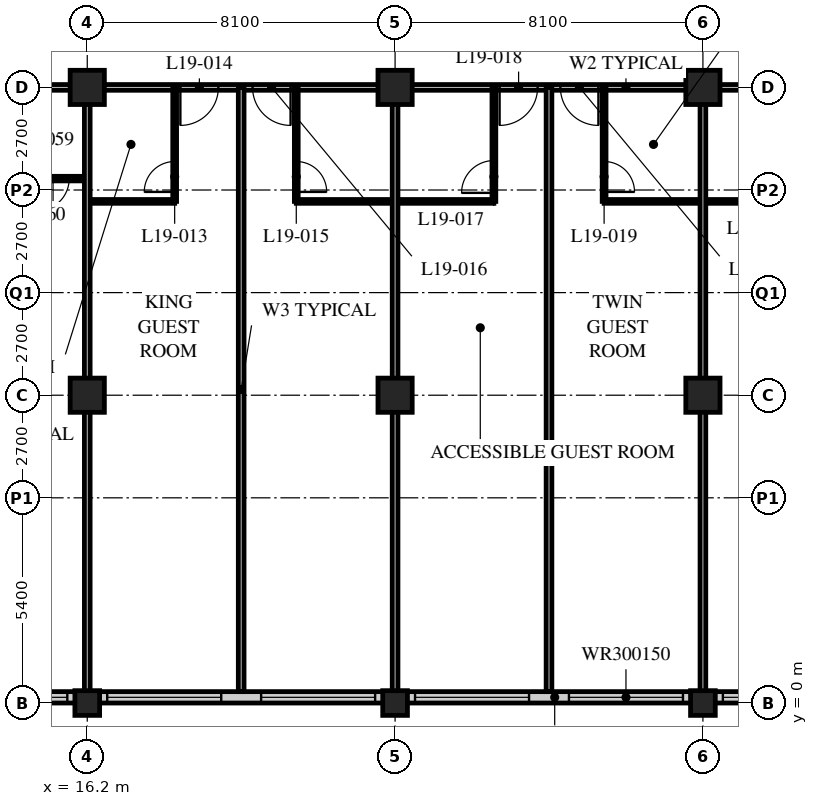
"""IFC4 building model, lengths in metres.
Left out: names, types, materials, properties, quantities, classifications, styles, units other than length and angle.
Written with IfcOpenShell. Run it as: python <this file> out.ifc"""

import sys

from ifc_helpers import new_model, si_unit, direction, frame, frame_2d, origin, origin_2d, place, context, subcontext, project, spatial, rectangle, hollow_rectangle, extrude, element, fill, save


model = new_model("IFC4")
c1 = context("Model", 3, precision=1e-05, world=origin(), true_north=direction((0.0, 1.0)))
c2 = subcontext(c1, "Body", "Model", "MODEL_VIEW")
j1 = project(units=[si_unit("LENGTHUNIT", "METRE"), si_unit("PLANEANGLEUNIT", "RADIAN")], contexts=[c1])
p1 = place(None, origin())
s1 = spatial("IfcSite", under=j1, at=p1, CompositionType="ELEMENT")
p2 = place(p1, origin())
s2 = spatial("IfcBuilding", under=s1, at=p2, CompositionType="ELEMENT")
p3 = place(p2, frame((0.0, 0.0, 77.2)))
s3 = spatial("IfcBuildingStorey", under=s2, at=p3, CompositionType="ELEMENT", Elevation=77.2)
p4 = place(p3, frame((16.2, 0.0, 0.0), z_axis=(0.0, 0.0, 1.0), x_axis=(1.0, 0.0, 0.0)))
e1 = element("IfcColumn", 1, at=p4, inside=s3, PredefinedType="COLUMN", context=c2, shape_type="SweptSolid", body=[
    extrude(hollow_rectangle(XDim=0.65, YDim=0.65, WallThickness=0.05, at=origin_2d()), origin(), (0.0, 0.0, 1.0), 3.4),
])
for number, where, z_axis, x_axis in (
    (2, (16.2, 8.1, 0.0), (0.0, 0.0, 1.0), (1.0, 0.0, 0.0)),
    (3, (16.2, 16.2, 0.0), (0.0, 0.0, 1.0), (1.0, 0.0, 0.0)),
):
    element("IfcColumn", number, at=place(p3, frame(where, z_axis=z_axis, x_axis=x_axis)), inside=s3, PredefinedType="COLUMN", context=c2, shape_type="SweptSolid", body=[
        extrude(hollow_rectangle(XDim=0.9, YDim=0.9, WallThickness=0.09, at=origin_2d()), origin(), (0.0, 0.0, 1.0), 3.4),
    ])
p5 = place(p3, frame((24.3, 0.0, 0.0), z_axis=(0.0, 0.0, 1.0), x_axis=(1.0, 0.0, 0.0)))
e4 = element("IfcColumn", 4, at=p5, inside=s3, PredefinedType="COLUMN", context=c2, shape_type="SweptSolid", body=[
    extrude(hollow_rectangle(XDim=0.65, YDim=0.65, WallThickness=0.05, at=origin_2d()), origin(), (0.0, 0.0, 1.0), 3.4),
])
for number, where, z_axis, x_axis in (
    (5, (24.3, 8.1, 0.0), (0.0, 0.0, 1.0), (1.0, 0.0, 0.0)),
    (6, (24.3, 16.2, 0.0), (0.0, 0.0, 1.0), (1.0, 0.0, 0.0)),
):
    element("IfcColumn", number, at=place(p3, frame(where, z_axis=z_axis, x_axis=x_axis)), inside=s3, PredefinedType="COLUMN", context=c2, shape_type="SweptSolid", body=[
        extrude(hollow_rectangle(XDim=0.9, YDim=0.9, WallThickness=0.09, at=origin_2d()), origin(), (0.0, 0.0, 1.0), 3.4),
    ])
p6 = place(p3, frame((32.4, 0.0, 0.0), z_axis=(0.0, 0.0, 1.0), x_axis=(1.0, 0.0, 0.0)))
e7 = element("IfcColumn", 7, at=p6, inside=s3, PredefinedType="COLUMN", context=c2, shape_type="SweptSolid", body=[
    extrude(hollow_rectangle(XDim=0.65, YDim=0.65, WallThickness=0.05, at=origin_2d()), origin(), (0.0, 0.0, 1.0), 3.4),
])
for number, where, z_axis, x_axis in (
    (8, (32.4, 8.1, 0.0), (0.0, 0.0, 1.0), (1.0, 0.0, 0.0)),
    (9, (32.4, 16.2, 0.0), (0.0, 0.0, 1.0), (1.0, 0.0, 0.0)),
):
    element("IfcColumn", number, at=place(p3, frame(where, z_axis=z_axis, x_axis=x_axis)), inside=s3, PredefinedType="COLUMN", context=c2, shape_type="SweptSolid", body=[
        extrude(hollow_rectangle(XDim=0.9, YDim=0.9, WallThickness=0.09, at=origin_2d()), origin(), (0.0, 0.0, 1.0), 3.4),
    ])
p7 = place(p3, frame((8.4, 0.15, 0.0), z_axis=(0.0, 0.0, 1.0), x_axis=(1.0, 0.0, 0.0)))
e10 = element("IfcWall", 10, at=p7, inside=s3, PredefinedType="SOLIDWALL", context=c2, shape_type="SweptSolid", body=[
    extrude(rectangle(XDim=40.2, YDim=0.3, at=frame_2d((20.1, 0.0))), origin(), (0.0, 0.0, 1.0), 3.19),
])
p8 = place(p7, frame((0.225, 0.0, 0.9)))
e11 = element("IfcOpeningElement", 11, at=p8, cuts=e10, PredefinedType="OPENING", context=c2, shape_type="SweptSolid", body=[
    extrude(rectangle(XDim=3.0, YDim=1.5, at=frame_2d((1.5, 0.75))), frame((0.0, 0.16, 0.0), z_axis=(0.0, -1.0, 0.0), x_axis=(1.0, 0.0, 0.0)), (0.0, 0.0, 1.0), 0.32),
])
p9 = place(p7, frame((4.275, 0.0, 0.9)))
e12 = element("IfcOpeningElement", 12, at=p9, cuts=e10, PredefinedType="OPENING", context=c2, shape_type="SweptSolid", body=[
    extrude(rectangle(XDim=3.0, YDim=1.5, at=frame_2d((1.5, 0.75))), frame((0.0, 0.16, 0.0), z_axis=(0.0, -1.0, 0.0), x_axis=(1.0, 0.0, 0.0)), (0.0, 0.0, 1.0), 0.32),
])
p10 = place(p7, frame((8.325, 0.0, 0.9)))
e13 = element("IfcOpeningElement", 13, at=p10, cuts=e10, PredefinedType="OPENING", context=c2, shape_type="SweptSolid", body=[
    extrude(rectangle(XDim=3.0, YDim=1.5, at=frame_2d((1.5, 0.75))), frame((0.0, 0.16, 0.0), z_axis=(0.0, -1.0, 0.0), x_axis=(1.0, 0.0, 0.0)), (0.0, 0.0, 1.0), 0.32),
])
p11 = place(p7, frame((12.375, 0.0, 0.9)))
e14 = element("IfcOpeningElement", 14, at=p11, cuts=e10, PredefinedType="OPENING", context=c2, shape_type="SweptSolid", body=[
    extrude(rectangle(XDim=3.0, YDim=1.5, at=frame_2d((1.5, 0.75))), frame((0.0, 0.16, 0.0), z_axis=(0.0, -1.0, 0.0), x_axis=(1.0, 0.0, 0.0)), (0.0, 0.0, 1.0), 0.32),
])
p12 = place(p7, frame((16.425, 0.0, 0.9)))
e15 = element("IfcOpeningElement", 15, at=p12, cuts=e10, PredefinedType="OPENING", context=c2, shape_type="SweptSolid", body=[
    extrude(rectangle(XDim=3.0, YDim=1.5, at=frame_2d((1.5, 0.75))), frame((0.0, 0.16, 0.0), z_axis=(0.0, -1.0, 0.0), x_axis=(1.0, 0.0, 0.0)), (0.0, 0.0, 1.0), 0.32),
])
p13 = place(p7, frame((20.475, 0.0, 0.9)))
e16 = element("IfcOpeningElement", 16, at=p13, cuts=e10, PredefinedType="OPENING", context=c2, shape_type="SweptSolid", body=[
    extrude(rectangle(XDim=3.0, YDim=1.5, at=frame_2d((1.5, 0.75))), frame((0.0, 0.16, 0.0), z_axis=(0.0, -1.0, 0.0), x_axis=(1.0, 0.0, 0.0)), (0.0, 0.0, 1.0), 0.32),
])
p14 = place(p7, frame((24.525, 0.0, 0.9)))
e17 = element("IfcOpeningElement", 17, at=p14, cuts=e10, PredefinedType="OPENING", context=c2, shape_type="SweptSolid", body=[
    extrude(rectangle(XDim=3.0, YDim=1.5, at=frame_2d((1.5, 0.75))), frame((0.0, 0.16, 0.0), z_axis=(0.0, -1.0, 0.0), x_axis=(1.0, 0.0, 0.0)), (0.0, 0.0, 1.0), 0.32),
])
p15 = place(p7, frame((28.575, 0.0, 0.9)))
e18 = element("IfcOpeningElement", 18, at=p15, cuts=e10, PredefinedType="OPENING", context=c2, shape_type="SweptSolid", body=[
    extrude(rectangle(XDim=3.0, YDim=1.5, at=frame_2d((1.5, 0.75))), frame((0.0, 0.16, 0.0), z_axis=(0.0, -1.0, 0.0), x_axis=(1.0, 0.0, 0.0)), (0.0, 0.0, 1.0), 0.32),
])
p16 = place(p7, frame((32.625, 0.0, 0.9)))
e19 = element("IfcOpeningElement", 19, at=p16, cuts=e10, PredefinedType="OPENING", context=c2, shape_type="SweptSolid", body=[
    extrude(rectangle(XDim=3.0, YDim=1.5, at=frame_2d((1.5, 0.75))), frame((0.0, 0.16, 0.0), z_axis=(0.0, -1.0, 0.0), x_axis=(1.0, 0.0, 0.0)), (0.0, 0.0, 1.0), 0.32),
])
p17 = place(p7, frame((36.675, 0.0, 0.9)))
e20 = element("IfcOpeningElement", 20, at=p17, cuts=e10, PredefinedType="OPENING", context=c2, shape_type="SweptSolid", body=[
    extrude(rectangle(XDim=3.0, YDim=1.5, at=frame_2d((1.5, 0.75))), frame((0.0, 0.16, 0.0), z_axis=(0.0, -1.0, 0.0), x_axis=(1.0, 0.0, 0.0)), (0.0, 0.0, 1.0), 0.32),
])
p18 = place(p3, frame((12.15, 16.2, 0.0), z_axis=(0.0, 0.0, 1.0), x_axis=(1.0, 0.0, 0.0)))
e21 = element("IfcWall", 21, at=p18, inside=s3, PredefinedType="PARTITIONING", context=c2, shape_type="SweptSolid", body=[
    extrude(rectangle(XDim=36.45, YDim=0.15, at=frame_2d((18.225, 0.0))), origin(), (0.0, 0.0, 1.0), 2.428),
])
p19 = place(p18, frame((6.5, 0.0, 0.0)))
e22 = element("IfcOpeningElement", 22, at=p19, cuts=e21, PredefinedType="OPENING", context=c2, shape_type="SweptSolid", body=[
    extrude(rectangle(XDim=1.0, YDim=2.1, at=frame_2d((0.5, 1.05))), frame((0.0, 0.085, 0.0), z_axis=(0.0, -1.0, 0.0), x_axis=(1.0, 0.0, 0.0)), (0.0, 0.0, 1.0), 0.17),
])
p20 = place(p18, frame((8.4, 0.0, 0.0)))
e23 = element("IfcOpeningElement", 23, at=p20, cuts=e21, PredefinedType="OPENING", context=c2, shape_type="SweptSolid", body=[
    extrude(rectangle(XDim=1.0, YDim=2.1, at=frame_2d((0.5, 1.05))), frame((0.0, 0.085, 0.0), z_axis=(0.0, -1.0, 0.0), x_axis=(1.0, 0.0, 0.0)), (0.0, 0.0, 1.0), 0.17),
])
p21 = place(p18, frame((14.9, 0.0, 0.0)))
e24 = element("IfcOpeningElement", 24, at=p21, cuts=e21, PredefinedType="OPENING", context=c2, shape_type="SweptSolid", body=[
    extrude(rectangle(XDim=1.0, YDim=2.1, at=frame_2d((0.5, 1.05))), frame((0.0, 0.085, 0.0), z_axis=(0.0, -1.0, 0.0), x_axis=(1.0, 0.0, 0.0)), (0.0, 0.0, 1.0), 0.17),
])
p22 = place(p18, frame((16.5, 0.0, 0.0)))
e25 = element("IfcOpeningElement", 25, at=p22, cuts=e21, PredefinedType="OPENING", context=c2, shape_type="SweptSolid", body=[
    extrude(rectangle(XDim=1.0, YDim=2.1, at=frame_2d((0.5, 1.05))), frame((0.0, 0.085, 0.0), z_axis=(0.0, -1.0, 0.0), x_axis=(1.0, 0.0, 0.0)), (0.0, 0.0, 1.0), 0.17),
])
p23 = place(p18, frame((22.7, 0.0, 0.0)))
e26 = element("IfcOpeningElement", 26, at=p23, cuts=e21, PredefinedType="OPENING", context=c2, shape_type="SweptSolid", body=[
    extrude(rectangle(XDim=1.0, YDim=2.1, at=frame_2d((0.5, 1.05))), frame((0.0, 0.085, 0.0), z_axis=(0.0, -1.0, 0.0), x_axis=(1.0, 0.0, 0.0)), (0.0, 0.0, 1.0), 0.17),
])
p24 = place(p18, frame((24.9, 0.0, 0.0)))
e27 = element("IfcOpeningElement", 27, at=p24, cuts=e21, PredefinedType="OPENING", context=c2, shape_type="SweptSolid", body=[
    extrude(rectangle(XDim=1.0, YDim=2.1, at=frame_2d((0.5, 1.05))), frame((0.0, 0.085, 0.0), z_axis=(0.0, -1.0, 0.0), x_axis=(1.0, 0.0, 0.0)), (0.0, 0.0, 1.0), 0.17),
])
p25 = place(p18, frame((30.8, 0.0, 0.0)))
e28 = element("IfcOpeningElement", 28, at=p25, cuts=e21, PredefinedType="OPENING", context=c2, shape_type="SweptSolid", body=[
    extrude(rectangle(XDim=1.0, YDim=2.1, at=frame_2d((0.5, 1.05))), frame((0.0, 0.085, 0.0), z_axis=(0.0, -1.0, 0.0), x_axis=(1.0, 0.0, 0.0)), (0.0, 0.0, 1.0), 0.17),
])
p26 = place(p18, frame((1.525, 0.0, 0.0)))
e29 = element("IfcOpeningElement", 29, at=p26, cuts=e21, PredefinedType="OPENING", context=c2, shape_type="SweptSolid", body=[
    extrude(rectangle(XDim=1.0, YDim=2.1, at=frame_2d((0.5, 1.05))), frame((0.0, 0.085, 0.0), z_axis=(0.0, -1.0, 0.0), x_axis=(1.0, 0.0, 0.0)), (0.0, 0.0, 1.0), 0.17),
])
p27 = place(p18, frame((33.925, 0.0, 0.0)))
e30 = element("IfcOpeningElement", 30, at=p27, cuts=e21, PredefinedType="OPENING", context=c2, shape_type="SweptSolid", body=[
    extrude(rectangle(XDim=1.0, YDim=2.1, at=frame_2d((0.5, 1.05))), frame((0.0, 0.085, 0.0), z_axis=(0.0, -1.0, 0.0), x_axis=(1.0, 0.0, 0.0)), (0.0, 0.0, 1.0), 0.17),
])
p28 = place(p3, frame((16.2, 13.2, 0.0), z_axis=(0.0, 0.0, 1.0), x_axis=(1.0, 0.0, 0.0)))
e31 = element("IfcWall", 31, at=p28, inside=s3, PredefinedType="PARTITIONING", context=c2, shape_type="SweptSolid", body=[
    extrude(rectangle(XDim=2.3, YDim=0.1, at=frame_2d((1.15, 0.0))), origin(), (0.0, 0.0, 1.0), 3.19),
])
p29 = place(p3, frame((18.5, 16.2, 0.0), z_axis=(0.0, 0.0, 1.0), x_axis=(0.0, -1.0, 0.0)))
e32 = element("IfcWall", 32, at=p29, inside=s3, PredefinedType="PARTITIONING", context=c2, shape_type="SweptSolid", body=[
    extrude(rectangle(XDim=3.0, YDim=0.1, at=frame_2d((1.5, 0.0))), origin(), (0.0, 0.0, 1.0), 3.19),
])
p30 = place(p29, frame((1.95, 0.0, 0.0)))
e33 = element("IfcOpeningElement", 33, at=p30, cuts=e32, PredefinedType="OPENING", context=c2, shape_type="SweptSolid", body=[
    extrude(rectangle(XDim=0.8, YDim=2.1, at=frame_2d((0.4, 1.05))), frame((0.0, 0.06, 0.0), z_axis=(0.0, -1.0, 0.0), x_axis=(1.0, 0.0, 0.0)), (0.0, 0.0, 1.0), 0.12),
])
p31 = place(p3, frame((20.25, 16.2, 0.0), z_axis=(0.0, 0.0, 1.0), x_axis=(0.0, -1.0, 0.0)))
e34 = element("IfcWall", 34, at=p31, inside=s3, PredefinedType="PARTITIONING", context=c2, shape_type="SweptSolid", body=[
    extrude(rectangle(XDim=15.9, YDim=0.15, at=frame_2d((7.95, 0.0))), origin(), (0.0, 0.0, 1.0), 3.19),
])
p32 = place(p3, frame((21.7, 13.2, 0.0), z_axis=(0.0, 0.0, 1.0), x_axis=(1.0, 0.0, 0.0)))
e35 = element("IfcWall", 35, at=p32, inside=s3, PredefinedType="PARTITIONING", context=c2, shape_type="SweptSolid", body=[
    extrude(rectangle(XDim=5.2, YDim=0.1, at=frame_2d((2.6, 0.0))), origin(), (0.0, 0.0, 1.0), 3.19),
])
p33 = place(p3, frame((21.7, 16.2, 0.0), z_axis=(0.0, 0.0, 1.0), x_axis=(0.0, -1.0, 0.0)))
e36 = element("IfcWall", 36, at=p33, inside=s3, PredefinedType="PARTITIONING", context=c2, shape_type="SweptSolid", body=[
    extrude(rectangle(XDim=3.0, YDim=0.1, at=frame_2d((1.5, 0.0))), origin(), (0.0, 0.0, 1.0), 3.19),
])
p34 = place(p33, frame((1.95, 0.0, 0.0)))
e37 = element("IfcOpeningElement", 37, at=p34, cuts=e36, PredefinedType="OPENING", context=c2, shape_type="SweptSolid", body=[
    extrude(rectangle(XDim=0.8, YDim=2.1, at=frame_2d((0.4, 1.05))), frame((0.0, 0.06, 0.0), z_axis=(0.0, -1.0, 0.0), x_axis=(1.0, 0.0, 0.0)), (0.0, 0.0, 1.0), 0.12),
])
p35 = place(p3, frame((24.3, 16.2, 0.0), z_axis=(0.0, 0.0, 1.0), x_axis=(0.0, -1.0, 0.0)))
e38 = element("IfcWall", 38, at=p35, inside=s3, PredefinedType="PARTITIONING", context=c2, shape_type="SweptSolid", body=[
    extrude(rectangle(XDim=15.9, YDim=0.15, at=frame_2d((7.95, 0.0))), origin(), (0.0, 0.0, 1.0), 2.428),
])
p36 = place(p3, frame((26.9, 16.2, 0.0), z_axis=(0.0, 0.0, 1.0), x_axis=(0.0, -1.0, 0.0)))
e39 = element("IfcWall", 39, at=p36, inside=s3, PredefinedType="PARTITIONING", context=c2, shape_type="SweptSolid", body=[
    extrude(rectangle(XDim=3.0, YDim=0.1, at=frame_2d((1.5, 0.0))), origin(), (0.0, 0.0, 1.0), 3.19),
])
p37 = place(p36, frame((1.925, 0.0, 0.0)))
e40 = element("IfcOpeningElement", 40, at=p37, cuts=e39, PredefinedType="OPENING", context=c2, shape_type="SweptSolid", body=[
    extrude(rectangle(XDim=0.85, YDim=2.1, at=frame_2d((0.425, 1.05))), frame((0.0, 0.06, 0.0), z_axis=(0.0, -1.0, 0.0), x_axis=(1.0, 0.0, 0.0)), (0.0, 0.0, 1.0), 0.12),
])
p38 = place(p3, frame((28.35, 16.2, 0.0), z_axis=(0.0, 0.0, 1.0), x_axis=(0.0, -1.0, 0.0)))
e41 = element("IfcWall", 41, at=p38, inside=s3, PredefinedType="PARTITIONING", context=c2, shape_type="SweptSolid", body=[
    extrude(rectangle(XDim=15.9, YDim=0.15, at=frame_2d((7.95, 0.0))), origin(), (0.0, 0.0, 1.0), 3.19),
])
p39 = place(p3, frame((29.8, 13.2, 0.0), z_axis=(0.0, 0.0, 1.0), x_axis=(1.0, 0.0, 0.0)))
e42 = element("IfcWall", 42, at=p39, inside=s3, PredefinedType="PARTITIONING", context=c2, shape_type="SweptSolid", body=[
    extrude(rectangle(XDim=4.9, YDim=0.1, at=frame_2d((2.45, 0.0))), origin(), (0.0, 0.0, 1.0), 3.19),
])
p40 = place(p3, frame((29.8, 16.2, 0.0), z_axis=(0.0, 0.0, 1.0), x_axis=(0.0, -1.0, 0.0)))
e43 = element("IfcWall", 43, at=p40, inside=s3, PredefinedType="PARTITIONING", context=c2, shape_type="SweptSolid", body=[
    extrude(rectangle(XDim=3.0, YDim=0.1, at=frame_2d((1.5, 0.0))), origin(), (0.0, 0.0, 1.0), 3.19),
])
p41 = place(p40, frame((1.95, 0.0, 0.0)))
e44 = element("IfcOpeningElement", 44, at=p41, cuts=e43, PredefinedType="OPENING", context=c2, shape_type="SweptSolid", body=[
    extrude(rectangle(XDim=0.8, YDim=2.1, at=frame_2d((0.4, 1.05))), frame((0.0, 0.06, 0.0), z_axis=(0.0, -1.0, 0.0), x_axis=(1.0, 0.0, 0.0)), (0.0, 0.0, 1.0), 0.12),
])
p42 = place(p3, frame((32.4, 16.2, 0.0), z_axis=(0.0, 0.0, 1.0), x_axis=(0.0, -1.0, 0.0)))
e45 = element("IfcWall", 45, at=p42, inside=s3, PredefinedType="PARTITIONING", context=c2, shape_type="SweptSolid", body=[
    extrude(rectangle(XDim=15.9, YDim=0.15, at=frame_2d((7.95, 0.0))), origin(), (0.0, 0.0, 1.0), 2.428),
])
p43 = place(p3, frame((8.15, 13.8, 0.0), z_axis=(0.0, 0.0, 1.0), x_axis=(1.0, 0.0, 0.0)))
e46 = element("IfcWall", 46, at=p43, inside=s3, PredefinedType="PARTITIONING", context=c2, shape_type="SweptSolid", body=[
    extrude(rectangle(XDim=8.05, YDim=0.12, at=frame_2d((4.025, 0.0))), origin(), (0.0, 0.0, 1.0), 3.19),
])
p44 = place(p43, frame((6.725, 0.0, 0.0)))
e47 = element("IfcOpeningElement", 47, at=p44, cuts=e46, PredefinedType="OPENING", context=c2, shape_type="SweptSolid", body=[
    extrude(rectangle(XDim=0.85, YDim=2.1, at=frame_2d((0.425, 1.05))), frame((0.0, 0.07, 0.0), z_axis=(0.0, -1.0, 0.0), x_axis=(1.0, 0.0, 0.0)), (0.0, 0.0, 1.0), 0.14),
])
p45 = place(p43, frame((2.875, 0.0, 0.0)))
e48 = element("IfcOpeningElement", 48, at=p45, cuts=e46, PredefinedType="OPENING", context=c2, shape_type="SweptSolid", body=[
    extrude(rectangle(XDim=0.85, YDim=2.1, at=frame_2d((0.425, 1.05))), frame((0.0, 0.07, 0.0), z_axis=(0.0, -1.0, 0.0), x_axis=(1.0, 0.0, 0.0)), (0.0, 0.0, 1.0), 0.14),
])
p46 = place(p3, frame((16.2, 16.2, 0.0), z_axis=(0.0, 0.0, 1.0), x_axis=(0.0, -1.0, 0.0)))
e49 = element("IfcWall", 49, at=p46, inside=s3, PredefinedType="PARTITIONING", context=c2, shape_type="SweptSolid", body=[
    extrude(rectangle(XDim=15.9, YDim=0.15, at=frame_2d((7.95, 0.0))), origin(), (0.0, 0.0, 1.0), 2.428),
])
p47 = place(p9, origin())
e50 = element("IfcWindow", 50, at=p47, inside=s3, PartitioningType="SINGLE_PANEL", PredefinedType="WINDOW", context=c2, shape_type="SweptSolid", body=[
    extrude(rectangle(XDim=3.0, YDim=1.5, at=frame_2d((1.5, 0.75))), frame((0.0, 0.03, 0.0), z_axis=(0.0, -1.0, 0.0), x_axis=(1.0, 0.0, 0.0)), (0.0, 0.0, 1.0), 0.06),
])
fill(e12, e50)
p48 = place(p10, origin())
e51 = element("IfcWindow", 51, at=p48, inside=s3, PartitioningType="SINGLE_PANEL", PredefinedType="WINDOW", context=c2, shape_type="SweptSolid", body=[
    extrude(rectangle(XDim=3.0, YDim=1.5, at=frame_2d((1.5, 0.75))), frame((0.0, 0.03, 0.0), z_axis=(0.0, -1.0, 0.0), x_axis=(1.0, 0.0, 0.0)), (0.0, 0.0, 1.0), 0.06),
])
fill(e13, e51)
p49 = place(p11, origin())
e52 = element("IfcWindow", 52, at=p49, inside=s3, PartitioningType="SINGLE_PANEL", PredefinedType="WINDOW", context=c2, shape_type="SweptSolid", body=[
    extrude(rectangle(XDim=3.0, YDim=1.5, at=frame_2d((1.5, 0.75))), frame((0.0, 0.03, 0.0), z_axis=(0.0, -1.0, 0.0), x_axis=(1.0, 0.0, 0.0)), (0.0, 0.0, 1.0), 0.06),
])
fill(e14, e52)
p50 = place(p12, origin())
e53 = element("IfcWindow", 53, at=p50, inside=s3, PartitioningType="SINGLE_PANEL", PredefinedType="WINDOW", context=c2, shape_type="SweptSolid", body=[
    extrude(rectangle(XDim=3.0, YDim=1.5, at=frame_2d((1.5, 0.75))), frame((0.0, 0.03, 0.0), z_axis=(0.0, -1.0, 0.0), x_axis=(1.0, 0.0, 0.0)), (0.0, 0.0, 1.0), 0.06),
])
fill(e15, e53)
p51 = place(p13, origin())
e54 = element("IfcWindow", 54, at=p51, inside=s3, PartitioningType="SINGLE_PANEL", PredefinedType="WINDOW", context=c2, shape_type="SweptSolid", body=[
    extrude(rectangle(XDim=3.0, YDim=1.5, at=frame_2d((1.5, 0.75))), frame((0.0, 0.03, 0.0), z_axis=(0.0, -1.0, 0.0), x_axis=(1.0, 0.0, 0.0)), (0.0, 0.0, 1.0), 0.06),
])
fill(e16, e54)
p52 = place(p14, origin())
e55 = element("IfcWindow", 55, at=p52, inside=s3, PartitioningType="SINGLE_PANEL", PredefinedType="WINDOW", context=c2, shape_type="SweptSolid", body=[
    extrude(rectangle(XDim=3.0, YDim=1.5, at=frame_2d((1.5, 0.75))), frame((0.0, 0.03, 0.0), z_axis=(0.0, -1.0, 0.0), x_axis=(1.0, 0.0, 0.0)), (0.0, 0.0, 1.0), 0.06),
])
fill(e17, e55)
p53 = place(p30, origin())
e56 = element("IfcDoor", 56, at=p53, inside=s3, OperationType="SINGLE_SWING_LEFT", PredefinedType="DOOR", context=c2, shape_type="SweptSolid", body=[
    extrude(rectangle(XDim=0.8, YDim=2.1, at=frame_2d((0.4, 1.05))), frame((0.0, 0.025, 0.0), z_axis=(0.0, -1.0, 0.0), x_axis=(1.0, 0.0, 0.0)), (0.0, 0.0, 1.0), 0.05),
])
fill(e33, e56)
p54 = place(p19, origin())
e57 = element("IfcDoor", 57, at=p54, inside=s3, OperationType="SINGLE_SWING_RIGHT", PredefinedType="DOOR", context=c2, shape_type="SweptSolid", body=[
    extrude(rectangle(XDim=1.0, YDim=2.1, at=frame_2d((0.5, 1.05))), frame((0.0, 0.025, 0.0), z_axis=(0.0, -1.0, 0.0), x_axis=(1.0, 0.0, 0.0)), (0.0, 0.0, 1.0), 0.05),
])
fill(e22, e57)
p55 = place(p34, origin())
e58 = element("IfcDoor", 58, at=p55, inside=s3, OperationType="SINGLE_SWING_RIGHT", PredefinedType="DOOR", context=c2, shape_type="SweptSolid", body=[
    extrude(rectangle(XDim=0.8, YDim=2.1, at=frame_2d((0.4, 1.05))), frame((0.0, 0.025, 0.0), z_axis=(0.0, -1.0, 0.0), x_axis=(1.0, 0.0, 0.0)), (0.0, 0.0, 1.0), 0.05),
])
fill(e37, e58)
p56 = place(p20, origin())
e59 = element("IfcDoor", 59, at=p56, inside=s3, OperationType="SINGLE_SWING_LEFT", PredefinedType="DOOR", context=c2, shape_type="SweptSolid", body=[
    extrude(rectangle(XDim=1.0, YDim=2.1, at=frame_2d((0.5, 1.05))), frame((0.0, 0.025, 0.0), z_axis=(0.0, -1.0, 0.0), x_axis=(1.0, 0.0, 0.0)), (0.0, 0.0, 1.0), 0.05),
])
fill(e23, e59)
p57 = place(p37, origin())
e60 = element("IfcDoor", 60, at=p57, inside=s3, OperationType="SINGLE_SWING_LEFT", PredefinedType="DOOR", context=c2, shape_type="SweptSolid", body=[
    extrude(rectangle(XDim=0.85, YDim=2.1, at=frame_2d((0.425, 1.05))), frame((0.0, 0.025, 0.0), z_axis=(0.0, -1.0, 0.0), x_axis=(1.0, 0.0, 0.0)), (0.0, 0.0, 1.0), 0.05),
])
fill(e40, e60)
p58 = place(p21, origin())
e61 = element("IfcDoor", 61, at=p58, inside=s3, OperationType="SINGLE_SWING_RIGHT", PredefinedType="DOOR", context=c2, shape_type="SweptSolid", body=[
    extrude(rectangle(XDim=1.0, YDim=2.1, at=frame_2d((0.5, 1.05))), frame((0.0, 0.025, 0.0), z_axis=(0.0, -1.0, 0.0), x_axis=(1.0, 0.0, 0.0)), (0.0, 0.0, 1.0), 0.05),
])
fill(e24, e61)
p59 = place(p41, origin())
e62 = element("IfcDoor", 62, at=p59, inside=s3, OperationType="SINGLE_SWING_RIGHT", PredefinedType="DOOR", context=c2, shape_type="SweptSolid", body=[
    extrude(rectangle(XDim=0.8, YDim=2.1, at=frame_2d((0.4, 1.05))), frame((0.0, 0.025, 0.0), z_axis=(0.0, -1.0, 0.0), x_axis=(1.0, 0.0, 0.0)), (0.0, 0.0, 1.0), 0.05),
])
fill(e44, e62)
p60 = place(p22, origin())
e63 = element("IfcDoor", 63, at=p60, inside=s3, OperationType="SINGLE_SWING_LEFT", PredefinedType="DOOR", context=c2, shape_type="SweptSolid", body=[
    extrude(rectangle(XDim=1.0, YDim=2.1, at=frame_2d((0.5, 1.05))), frame((0.0, 0.025, 0.0), z_axis=(0.0, -1.0, 0.0), x_axis=(1.0, 0.0, 0.0)), (0.0, 0.0, 1.0), 0.05),
])
fill(e25, e63)
p61 = place(p44, origin())
e64 = element("IfcDoor", 64, at=p61, inside=s3, OperationType="SINGLE_SWING_RIGHT", PredefinedType="DOOR", context=c2, shape_type="SweptSolid", body=[
    extrude(rectangle(XDim=0.85, YDim=2.1, at=frame_2d((0.425, 1.05))), frame((0.0, 0.025, 0.0), z_axis=(0.0, -1.0, 0.0), x_axis=(1.0, 0.0, 0.0)), (0.0, 0.0, 1.0), 0.05),
])
fill(e47, e64)
save(model, sys.argv[1])
